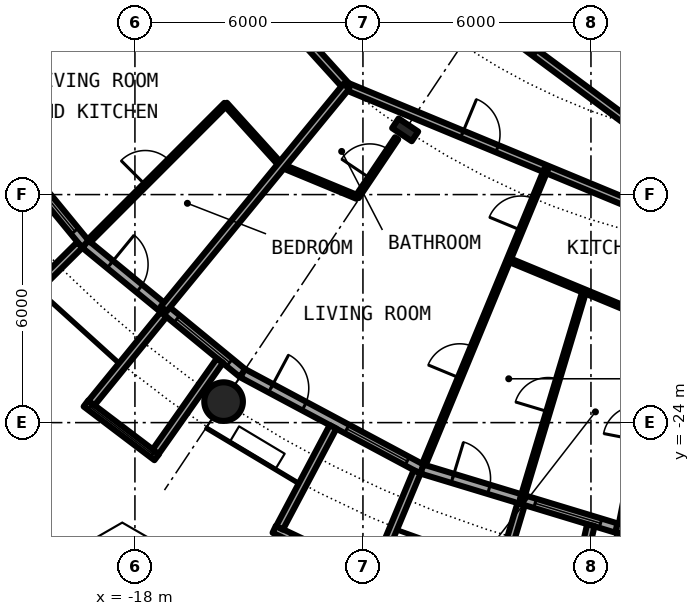
"""IFC4 building model, lengths in metres.
Left out: names, types, materials, properties, quantities, classifications, styles, units other than length and angle.
Written with IfcOpenShell. Run it as: python <this file> out.ifc"""

import sys

from ifc_helpers import new_model, si_unit, direction, frame, frame_2d, origin, origin_2d, place, context, subcontext, project, spatial, rectangle, circle, hollow_circle, i_section, extrude, element, fill, save


model = new_model("IFC4")
c1 = context("Model", 3, precision=1e-05, world=origin(), true_north=direction((0.0, 1.0)))
c2 = subcontext(c1, "Body", "Model", "MODEL_VIEW")
j1 = project(units=[si_unit("LENGTHUNIT", "METRE"), si_unit("PLANEANGLEUNIT", "RADIAN")], contexts=[c1])
p1 = place(None, origin())
s1 = spatial("IfcSite", under=j1, at=p1, CompositionType="ELEMENT")
p2 = place(p1, origin())
s2 = spatial("IfcBuilding", under=s1, at=p2, CompositionType="ELEMENT")
p3 = place(p2, frame((0.0, 0.0, 50.25)))
s3 = spatial("IfcBuildingStorey", under=s2, at=p3, CompositionType="ELEMENT", Elevation=50.25)
p4 = place(p3, frame((-15.667, -23.448, 0.0), z_axis=(0.0, 0.0, 1.0), x_axis=(1.0, 0.0, 0.0)))
e1 = element("IfcColumn", 1, at=p4, inside=s3, PredefinedType="COLUMN", context=c2, shape_type="SweptSolid", body=[
    extrude(hollow_circle(Radius=0.508, WallThickness=0.05, at=origin_2d()), origin(), (0.0, 0.0, 1.0), 3.05),
])
p5 = place(p3, frame((-10.889, -16.297, 0.0), z_axis=(0.0, 0.0, 1.0), x_axis=(-0.55557023302, -0.831469612303, 0.0)))
e2 = element("IfcColumn", 2, at=p5, inside=s3, PredefinedType="COLUMN", context=c2, shape_type="SweptSolid", body=[
    extrude(i_section(OverallWidth=0.305, OverallDepth=0.62, WebThickness=0.021, FlangeThickness=0.04, FilletRadius=0.027, at=origin_2d()), origin(), (0.0, 0.0, 1.0), 3.05),
])
p6 = place(p3, frame((-22.699, -15.167, 0.0), z_axis=(0.0, 0.0, 1.0), x_axis=(0.634382322723, -0.773019449054, 0.0)))
e3 = element("IfcWall", 3, at=p6, inside=s3, PredefinedType="SOLIDWALL", context=c2, shape_type="SweptSolid", body=[
    extrude(rectangle(XDim=5.352, YDim=0.25, at=frame_2d((2.676, 0.0))), origin(), (0.0, 0.0, 1.0), 2.7),
])
p7 = place(p6, frame((0.841, 0.0, 0.0)))
e4 = element("IfcOpeningElement", 4, at=p7, cuts=e3, PredefinedType="OPENING", context=c2, shape_type="SweptSolid", body=[
    extrude(rectangle(XDim=1.0, YDim=2.2, at=frame_2d((0.5, 1.1))), frame((0.0, 0.135, 0.0), z_axis=(0.0, -1.0, 0.0), x_axis=(1.0, 0.0, 0.0)), (0.0, 0.0, 1.0), 0.27),
])
p8 = place(p6, frame((3.111, 0.0, 0.3)))
e5 = element("IfcOpeningElement", 5, at=p8, cuts=e3, PredefinedType="OPENING", context=c2, shape_type="SweptSolid", body=[
    extrude(rectangle(XDim=1.8, YDim=2.1, at=frame_2d((0.9, 1.05))), frame((0.0, 0.135, 0.0), z_axis=(0.0, -1.0, 0.0), x_axis=(1.0, 0.0, 0.0)), (0.0, 0.0, 1.0), 0.27),
])
p9 = place(p3, frame((-19.45, -19.323, -0.03), z_axis=(0.0, 0.0, 1.0), x_axis=(-0.709727076896, -0.704476739375, 0.0)))
e6 = element("IfcWall", 6, at=p9, inside=s3, PredefinedType="SOLIDWALL", context=c2, shape_type="SweptSolid", body=[
    extrude(rectangle(XDim=2.883, YDim=0.2, at=frame_2d((1.441, 0.0))), origin(), (0.0, 0.0, 1.0), 2.73),
])
p10 = place(p3, frame((-19.304, -19.304, 0.0), z_axis=(0.0, 0.0, 1.0), x_axis=(0.773019449054, -0.634382322723, 0.0)))
e7 = element("IfcWall", 7, at=p10, inside=s3, PredefinedType="SOLIDWALL", context=c2, shape_type="SweptSolid", body=[
    extrude(rectangle(XDim=5.352, YDim=0.25, at=frame_2d((2.676, 0.0))), origin(), (0.0, 0.0, 1.0), 2.7),
])
p11 = place(p10, frame((0.841, 0.0, 0.0)))
e8 = element("IfcOpeningElement", 8, at=p11, cuts=e7, PredefinedType="OPENING", context=c2, shape_type="SweptSolid", body=[
    extrude(rectangle(XDim=1.0, YDim=2.2, at=frame_2d((0.5, 1.1))), frame((0.0, 0.135, 0.0), z_axis=(0.0, -1.0, 0.0), x_axis=(1.0, 0.0, 0.0)), (0.0, 0.0, 1.0), 0.27),
])
p12 = place(p10, frame((3.111, 0.0, 0.3)))
e9 = element("IfcOpeningElement", 9, at=p12, cuts=e7, PredefinedType="OPENING", context=c2, shape_type="SweptSolid", body=[
    extrude(rectangle(XDim=1.8, YDim=2.1, at=frame_2d((0.9, 1.05))), frame((0.0, 0.135, 0.0), z_axis=(0.0, -1.0, 0.0), x_axis=(1.0, 0.0, 0.0)), (0.0, 0.0, 1.0), 0.27),
])
p13 = place(p3, frame((-19.289, -23.497, -0.03), z_axis=(0.0, 0.0, 1.0), x_axis=(0.796842165306, -0.60418752353, 0.0)))
e10 = element("IfcWall", 10, at=p13, inside=s3, PredefinedType="SOLIDWALL", context=c2, shape_type="SweptSolid", body=[
    extrude(rectangle(XDim=2.337, YDim=0.2, at=frame_2d((1.168, 0.0))), origin(), (0.0, 0.0, 1.0), 2.73),
])
p14 = place(p13, frame((0.128, 0.0, 0.33)))
e11 = element("IfcOpeningElement", 11, at=p14, cuts=e10, PredefinedType="OPENING", context=c2, shape_type="SweptSolid", body=[
    extrude(circle(Radius=1.04, at=frame_2d((1.04, 1.04))), frame((0.0, 0.11, 0.0), z_axis=(0.0, -1.0, 0.0), x_axis=(1.0, 0.0, 0.0)), (0.0, 0.0, 1.0), 0.22),
])
p15 = place(p3, frame((-17.246, -21.155, -0.03), z_axis=(0.0, 0.0, 1.0), x_axis=(-0.631741648902, -0.775179004516, 0.0)))
e12 = element("IfcWall", 12, at=p15, inside=s3, PredefinedType="SOLIDWALL", context=c2, shape_type="SweptSolid", body=[
    extrude(rectangle(XDim=3.006, YDim=0.2, at=frame_2d((1.503, 0.0))), origin(), (0.0, 0.0, 1.0), 2.73),
])
p16 = place(p3, frame((-15.765, -22.37, -0.03), z_axis=(0.0, 0.0, 1.0), x_axis=(-0.576274612209, -0.817256123454, 0.0)))
e13 = element("IfcWall", 13, at=p16, inside=s3, PredefinedType="SOLIDWALL", context=c2, shape_type="SweptSolid", body=[
    extrude(rectangle(XDim=2.933, YDim=0.2, at=frame_2d((1.466, 0.0))), origin(), (0.0, 0.0, 1.0), 2.73),
])
p17 = place(p3, frame((-15.167, -22.699, 0.0), z_axis=(0.0, 0.0, 1.0), x_axis=(0.881915646801, -0.471407246368, 0.0)))
e14 = element("IfcWall", 14, at=p17, inside=s3, PredefinedType="SOLIDWALL", context=c2, shape_type="SweptSolid", body=[
    extrude(rectangle(XDim=5.352, YDim=0.25, at=frame_2d((2.676, 0.0))), origin(), (0.0, 0.0, 1.0), 2.7),
])
p18 = place(p17, frame((0.841, 0.0, 0.0)))
e15 = element("IfcOpeningElement", 15, at=p18, cuts=e14, PredefinedType="OPENING", context=c2, shape_type="SweptSolid", body=[
    extrude(rectangle(XDim=1.0, YDim=2.2, at=frame_2d((0.5, 1.1))), frame((0.0, 0.135, 0.0), z_axis=(0.0, -1.0, 0.0), x_axis=(1.0, 0.0, 0.0)), (0.0, 0.0, 1.0), 0.27),
])
p19 = place(p17, frame((3.111, 0.0, 0.3)))
e16 = element("IfcOpeningElement", 16, at=p19, cuts=e14, PredefinedType="OPENING", context=c2, shape_type="SweptSolid", body=[
    extrude(rectangle(XDim=1.8, YDim=2.1, at=frame_2d((0.9, 1.05))), frame((0.0, 0.135, 0.0), z_axis=(0.0, -1.0, 0.0), x_axis=(1.0, 0.0, 0.0)), (0.0, 0.0, 1.0), 0.27),
])
p20 = place(p3, frame((-14.335, -26.808, -0.03), z_axis=(0.0, 0.0, 1.0), x_axis=(0.904000060331, -0.427532327342, 0.0)))
e17 = element("IfcWall", 17, at=p20, inside=s3, PredefinedType="SOLIDWALL", context=c2, shape_type="SweptSolid", body=[
    extrude(rectangle(XDim=2.993, YDim=0.2, at=frame_2d((1.497, 0.0))), origin(), (0.0, 0.0, 1.0), 2.73),
])
p21 = place(p20, frame((0.457, 0.0, 0.33)))
e18 = element("IfcOpeningElement", 18, at=p21, cuts=e17, PredefinedType="OPENING", context=c2, shape_type="SweptSolid", body=[
    extrude(circle(Radius=1.04, at=frame_2d((1.04, 1.04))), frame((0.0, 0.11, 0.0), z_axis=(0.0, -1.0, 0.0), x_axis=(1.0, 0.0, 0.0)), (0.0, 0.0, 1.0), 0.22),
])
p22 = place(p3, frame((-12.787, -24.113, -0.03), z_axis=(0.0, 0.0, 1.0), x_axis=(-0.468365282436, -0.883534924159, 0.0)))
e19 = element("IfcWall", 19, at=p22, inside=s3, PredefinedType="SOLIDWALL", context=c2, shape_type="SweptSolid", body=[
    extrude(rectangle(XDim=3.006, YDim=0.2, at=frame_2d((1.503, 0.0))), origin(), (0.0, 0.0, 1.0), 2.73),
])
p23 = place(p3, frame((-10.575, -25.295, -0.03), z_axis=(0.0, 0.0, 1.0), x_axis=(-0.385697364644, -0.922625353492, 0.0)))
e20 = element("IfcWall", 20, at=p23, inside=s3, PredefinedType="SOLIDWALL", context=c2, shape_type="SweptSolid", body=[
    extrude(rectangle(XDim=2.883, YDim=0.2, at=frame_2d((1.442, 0.0))), origin(), (0.0, 0.0, 1.0), 2.73),
])
p24 = place(p3, frame((-10.447, -25.222, 0.0), z_axis=(0.0, 0.0, 1.0), x_axis=(0.956965678721, -0.290201119486, 0.0)))
e21 = element("IfcWall", 21, at=p24, inside=s3, PredefinedType="SOLIDWALL", context=c2, shape_type="SweptSolid", body=[
    extrude(rectangle(XDim=5.351, YDim=0.25, at=frame_2d((2.676, 0.0))), origin(), (0.0, 0.0, 1.0), 2.7),
])
p25 = place(p24, frame((0.841, 0.0, 0.0)))
e22 = element("IfcOpeningElement", 22, at=p25, cuts=e21, PredefinedType="OPENING", context=c2, shape_type="SweptSolid", body=[
    extrude(rectangle(XDim=1.0, YDim=2.2, at=frame_2d((0.5, 1.1))), frame((0.0, 0.135, 0.0), z_axis=(0.0, -1.0, 0.0), x_axis=(1.0, 0.0, 0.0)), (0.0, 0.0, 1.0), 0.27),
])
p26 = place(p24, frame((3.111, 0.0, 0.3)))
e23 = element("IfcOpeningElement", 23, at=p26, cuts=e21, PredefinedType="OPENING", context=c2, shape_type="SweptSolid", body=[
    extrude(rectangle(XDim=1.8, YDim=2.1, at=frame_2d((0.9, 1.05))), frame((0.0, 0.135, 0.0), z_axis=(0.0, -1.0, 0.0), x_axis=(1.0, 0.0, 0.0)), (0.0, 0.0, 1.0), 0.27),
])
p27 = place(p3, frame((-7.837, -26.144, -0.03), z_axis=(0.0, 0.0, 1.0), x_axis=(-0.287064767992, -0.957911174889, 0.0)))
e24 = element("IfcWall", 24, at=p27, inside=s3, PredefinedType="SOLIDWALL", context=c2, shape_type="SweptSolid", body=[
    extrude(rectangle(XDim=3.006, YDim=0.2, at=frame_2d((1.503, 0.0))), origin(), (0.0, 0.0, 1.0), 2.73),
])
p28 = place(p3, frame((-6.004, -26.7, -0.03), z_axis=(0.0, 0.0, 1.0), x_axis=(-0.219609259383, -0.975587911566, 0.0)))
e25 = element("IfcWall", 25, at=p28, inside=s3, PredefinedType="SOLIDWALL", context=c2, shape_type="SweptSolid", body=[
    extrude(rectangle(XDim=2.933, YDim=0.2, at=frame_2d((1.466, 0.0))), origin(), (0.0, 0.0, 1.0), 2.73),
])
p29 = place(p3, frame((-5.326, -26.775, 0.0), z_axis=(0.0, 0.0, 1.0), x_axis=(0.995173996315, -0.098126026407, 0.0)))
e26 = element("IfcWall", 26, at=p29, inside=s3, PredefinedType="SOLIDWALL", context=c2, shape_type="SweptSolid", body=[
    extrude(rectangle(XDim=5.352, YDim=0.25, at=frame_2d((2.676, 0.0))), origin(), (0.0, 0.0, 1.0), 2.7),
])
p30 = place(p29, frame((0.841, 0.0, 0.0)))
e27 = element("IfcOpeningElement", 27, at=p30, cuts=e26, PredefinedType="OPENING", context=c2, shape_type="SweptSolid", body=[
    extrude(rectangle(XDim=1.0, YDim=2.2, at=frame_2d((0.5, 1.1))), frame((0.0, 0.135, 0.0), z_axis=(0.0, -1.0, 0.0), x_axis=(1.0, 0.0, 0.0)), (0.0, 0.0, 1.0), 0.27),
])
p31 = place(p29, frame((3.111, 0.0, 0.3)))
e28 = element("IfcOpeningElement", 28, at=p31, cuts=e26, PredefinedType="OPENING", context=c2, shape_type="SweptSolid", body=[
    extrude(rectangle(XDim=1.8, YDim=2.1, at=frame_2d((0.9, 1.05))), frame((0.0, 0.135, 0.0), z_axis=(0.0, -1.0, 0.0), x_axis=(1.0, 0.0, 0.0)), (0.0, 0.0, 1.0), 0.27),
])
p32 = place(p3, frame((-15.617, -15.617, 0.0), z_axis=(0.0, 0.0, 1.0), x_axis=(0.671144831591, -0.741326254107, 0.0)))
e29 = element("IfcWall", 29, at=p32, inside=s3, PredefinedType="PARTITIONING", context=c2, shape_type="SweptSolid", body=[
    extrude(rectangle(XDim=2.181, YDim=0.1, at=frame_2d((1.091, 0.0))), origin(), (0.0, 0.0, 1.0), 2.7),
])
p33 = place(p3, frame((-14.147, -17.238, 0.0), z_axis=(0.0, 0.0, 1.0), x_axis=(0.923874819588, -0.382694810171, 0.0)))
e30 = element("IfcWall", 30, at=p33, inside=s3, PredefinedType="PARTITIONING", context=c2, shape_type="SweptSolid", body=[
    extrude(rectangle(XDim=2.158, YDim=0.1, at=frame_2d((1.079, 0.0))), origin(), (0.0, 0.0, 1.0), 2.7),
])
p34 = place(p3, frame((-8.164, -19.716, 0.0), z_axis=(0.0, 0.0, 1.0), x_axis=(0.92387253274, -0.38270033087, 0.0)))
e31 = element("IfcWall", 31, at=p34, inside=s3, PredefinedType="PARTITIONING", context=c2, shape_type="SweptSolid", body=[
    extrude(rectangle(XDim=6.475, YDim=0.1, at=frame_2d((3.238, 0.0))), origin(), (0.0, 0.0, 1.0), 2.7),
])
p35 = place(p3, frame((-16.193, -11.003, 0.0), z_axis=(0.0, 0.0, 1.0), x_axis=(0.671514934772, -0.740991020444, 0.0)))
e32 = element("IfcWall", 32, at=p35, inside=s3, PredefinedType="PARTITIONING", context=c2, shape_type="SweptSolid", body=[
    extrude(rectangle(XDim=5.598, YDim=0.2, at=frame_2d((2.799, 0.0))), origin(), (0.0, 0.0, 1.0), 2.38),
])
p36 = place(p35, frame((3.18, 0.0, 0.0)))
e33 = element("IfcOpeningElement", 33, at=p36, cuts=e32, PredefinedType="OPENING", context=c2, shape_type="SweptSolid", body=[
    extrude(rectangle(XDim=1.0, YDim=2.3, at=frame_2d((0.5, 1.15))), frame((0.0, 0.11, 0.0), z_axis=(0.0, -1.0, 0.0), x_axis=(1.0, 0.0, 0.0)), (0.0, 0.0, 1.0), 0.22),
])
p37 = place(p3, frame((-12.434, -15.151, 0.0), z_axis=(0.0, 0.0, 1.0), x_axis=(0.923888467236, -0.382661861319, 0.0)))
e34 = element("IfcWall", 34, at=p37, inside=s3, PredefinedType="PARTITIONING", context=c2, shape_type="SweptSolid", body=[
    extrude(rectangle(XDim=11.381, YDim=0.2, at=frame_2d((5.691, 0.0))), origin(), (0.0, 0.0, 1.0), 2.7),
])
p38 = place(p37, frame((3.292, 0.0, 0.0)))
e35 = element("IfcOpeningElement", 35, at=p38, cuts=e34, PredefinedType="OPENING", context=c2, shape_type="SweptSolid", body=[
    extrude(rectangle(XDim=1.0, YDim=2.3, at=frame_2d((0.5, 1.15))), frame((0.0, 0.11, 0.0), z_axis=(0.0, -1.0, 0.0), x_axis=(1.0, 0.0, 0.0)), (0.0, 0.0, 1.0), 0.22),
])
p39 = place(p3, frame((-14.037, -9.4, 0.0), z_axis=(0.0, 0.0, 1.0), x_axis=(0.803202106898, -0.595706618626, 0.0)))
e36 = element("IfcWall", 36, at=p39, inside=s3, PredefinedType="PARTITIONING", context=c2, shape_type="SweptSolid", body=[
    extrude(rectangle(XDim=11.368, YDim=0.2, at=frame_2d((5.684, 0.0))), origin(), (0.0, 0.0, 1.0), 2.7),
])
p40 = place(p39, frame((5.988, 0.0, 0.0)))
e37 = element("IfcOpeningElement", 37, at=p40, cuts=e36, PredefinedType="OPENING", context=c2, shape_type="SweptSolid", body=[
    extrude(rectangle(XDim=1.0, YDim=2.3, at=frame_2d((0.5, 1.15))), frame((0.0, 0.11, 0.0), z_axis=(0.0, -1.0, 0.0), x_axis=(1.0, 0.0, 0.0)), (0.0, 0.0, 1.0), 0.22),
])
p41 = place(p3, frame((-22.595, -15.098, 0.0), z_axis=(0.0, 0.0, 1.0), x_axis=(0.831387096605, 0.55569370664, 0.0)))
e38 = element("IfcWall", 38, at=p41, inside=s3, PredefinedType="PARTITIONING", context=c2, shape_type="SweptSolid", body=[
    extrude(rectangle(XDim=4.875, YDim=0.2, at=frame_2d((2.438, 0.0))), origin(), (0.0, 0.0, 1.0), 2.7),
])
p42 = place(p3, frame((-19.21, -19.222, 0.0), z_axis=(0.0, 0.0, 1.0), x_axis=(0.706914880313, 0.707298629994, 0.0)))
e39 = element("IfcWall", 39, at=p42, inside=s3, PredefinedType="PARTITIONING", context=c2, shape_type="SweptSolid", body=[
    extrude(rectangle(XDim=5.09, YDim=0.1, at=frame_2d((2.545, 0.0))), origin(), (0.0, 0.0, 1.0), 2.7),
])
p43 = place(p42, frame((2.095, 0.0, 0.0)))
e40 = element("IfcOpeningElement", 40, at=p43, cuts=e39, PredefinedType="OPENING", context=c2, shape_type="SweptSolid", body=[
    extrude(rectangle(XDim=0.9, YDim=2.3, at=frame_2d((0.45, 1.15))), frame((0.0, 0.06, 0.0), z_axis=(0.0, -1.0, 0.0), x_axis=(1.0, 0.0, 0.0)), (0.0, 0.0, 1.0), 0.12),
])
p44 = place(p3, frame((-17.241, -21.006, 0.0), z_axis=(0.0, 0.0, 1.0), x_axis=(0.634381303318, 0.773020285633, 0.0)))
e41 = element("IfcWall", 41, at=p44, inside=s3, PredefinedType="PARTITIONING", context=c2, shape_type="SweptSolid", body=[
    extrude(rectangle(XDim=7.576, YDim=0.2, at=frame_2d((3.788, 0.0))), origin(), (0.0, 0.0, 1.0), 2.7),
])
p45 = place(p3, frame((-12.153, -18.064, 0.0), z_axis=(0.0, 0.0, 1.0), x_axis=(0.558084773293, 0.829783939239, 0.0)))
e42 = element("IfcWall", 42, at=p45, inside=s3, PredefinedType="PARTITIONING", context=c2, shape_type="SweptSolid", body=[
    extrude(rectangle(XDim=1.862, YDim=0.1, at=frame_2d((0.931, 0.0))), origin(), (0.0, 0.0, 1.0), 2.7),
])
p46 = place(p45, frame((0.6, 0.0, 0.0)))
e43 = element("IfcOpeningElement", 43, at=p46, cuts=e42, PredefinedType="OPENING", context=c2, shape_type="SweptSolid", body=[
    extrude(rectangle(XDim=0.9, YDim=2.3, at=frame_2d((0.45, 1.15))), frame((0.0, 0.06, 0.0), z_axis=(0.0, -1.0, 0.0), x_axis=(1.0, 0.0, 0.0)), (0.0, 0.0, 1.0), 0.12),
])
p47 = place(p3, frame((-10.399, -25.106, 0.0), z_axis=(0.0, 0.0, 1.0), x_axis=(0.382697543868, 0.923873687209, 0.0)))
e44 = element("IfcWall", 44, at=p47, inside=s3, PredefinedType="PARTITIONING", context=c2, shape_type="SweptSolid", body=[
    extrude(rectangle(XDim=8.419, YDim=0.1, at=frame_2d((4.209, 0.0))), origin(), (0.0, 0.0, 1.0), 2.7),
])
p48 = place(p47, frame((6.677, 0.0, 0.0)))
e45 = element("IfcOpeningElement", 45, at=p48, cuts=e44, PredefinedType="OPENING", context=c2, shape_type="SweptSolid", body=[
    extrude(rectangle(XDim=0.9, YDim=2.3, at=frame_2d((0.45, 1.15))), frame((0.0, 0.06, 0.0), z_axis=(0.0, -1.0, 0.0), x_axis=(1.0, 0.0, 0.0)), (0.0, 0.0, 1.0), 0.12),
])
p49 = place(p47, frame((2.468, 0.0, 0.0)))
e46 = element("IfcOpeningElement", 46, at=p49, cuts=e44, PredefinedType="OPENING", context=c2, shape_type="SweptSolid", body=[
    extrude(rectangle(XDim=0.9, YDim=2.3, at=frame_2d((0.45, 1.15))), frame((0.0, 0.06, 0.0), z_axis=(0.0, -1.0, 0.0), x_axis=(1.0, 0.0, 0.0)), (0.0, 0.0, 1.0), 0.12),
])
p50 = place(p3, frame((-7.821, -26.025, 0.0), z_axis=(0.0, 0.0, 1.0), x_axis=(0.287793773423, 0.957692405723, 0.0)))
e47 = element("IfcWall", 47, at=p50, inside=s3, PredefinedType="PARTITIONING", context=c2, shape_type="SweptSolid", body=[
    extrude(rectangle(XDim=5.726, YDim=0.1, at=frame_2d((2.863, 0.0))), origin(), (0.0, 0.0, 1.0), 2.7),
])
p51 = place(p50, frame((2.413, 0.0, 0.0)))
e48 = element("IfcOpeningElement", 48, at=p51, cuts=e47, PredefinedType="OPENING", context=c2, shape_type="SweptSolid", body=[
    extrude(rectangle(XDim=0.9, YDim=2.3, at=frame_2d((0.45, 1.15))), frame((0.0, 0.06, 0.0), z_axis=(0.0, -1.0, 0.0), x_axis=(1.0, 0.0, 0.0)), (0.0, 0.0, 1.0), 0.12),
])
p52 = place(p3, frame((-5.217, -26.67, 0.0), z_axis=(0.0, 0.0, 1.0), x_axis=(0.192109041462, 0.981373586453, 0.0)))
e49 = element("IfcWall", 49, at=p52, inside=s3, PredefinedType="PARTITIONING", context=c2, shape_type="SweptSolid", body=[
    extrude(rectangle(XDim=5.404, YDim=0.1, at=frame_2d((2.702, 0.0))), origin(), (0.0, 0.0, 1.0), 2.7),
])
p53 = place(p52, frame((2.252, 0.0, 0.0)))
e50 = element("IfcOpeningElement", 50, at=p53, cuts=e49, PredefinedType="OPENING", context=c2, shape_type="SweptSolid", body=[
    extrude(rectangle(XDim=0.9, YDim=2.3, at=frame_2d((0.45, 1.15))), frame((0.0, 0.06, 0.0), z_axis=(0.0, -1.0, 0.0), x_axis=(1.0, 0.0, 0.0)), (0.0, 0.0, 1.0), 0.12),
])
p54 = place(p8, origin())
e51 = element("IfcWindow", 51, at=p54, inside=s3, PartitioningType="SINGLE_PANEL", PredefinedType="WINDOW", context=c2, shape_type="SweptSolid", body=[
    extrude(rectangle(XDim=1.8, YDim=2.1, at=frame_2d((0.9, 1.05))), frame((0.0, 0.03, 0.0), z_axis=(0.0, -1.0, 0.0), x_axis=(1.0, 0.0, 0.0)), (0.0, 0.0, 1.0), 0.06),
])
fill(e5, e51)
p55 = place(p11, origin())
e52 = element("IfcDoor", 52, at=p55, inside=s3, OperationType="SINGLE_SWING_LEFT", PredefinedType="DOOR", context=c2, shape_type="SweptSolid", body=[
    extrude(rectangle(XDim=1.0, YDim=2.2, at=frame_2d((0.5, 1.1))), frame((0.0, 0.025, 0.0), z_axis=(0.0, -1.0, 0.0), x_axis=(1.0, 0.0, 0.0)), (0.0, 0.0, 1.0), 0.05),
])
fill(e8, e52)
p56 = place(p12, origin())
e53 = element("IfcWindow", 53, at=p56, inside=s3, PartitioningType="SINGLE_PANEL", PredefinedType="WINDOW", context=c2, shape_type="SweptSolid", body=[
    extrude(rectangle(XDim=1.8, YDim=2.1, at=frame_2d((0.9, 1.05))), frame((0.0, 0.03, 0.0), z_axis=(0.0, -1.0, 0.0), x_axis=(1.0, 0.0, 0.0)), (0.0, 0.0, 1.0), 0.06),
])
fill(e9, e53)
p57 = place(p14, origin())
e54 = element("IfcWindow", 54, at=p57, inside=s3, PartitioningType="SINGLE_PANEL", PredefinedType="WINDOW", context=c2, shape_type="SweptSolid", body=[
    extrude(circle(Radius=1.04, at=frame_2d((1.04, 1.04))), frame((0.0, 0.03, 0.0), z_axis=(0.0, -1.0, 0.0), x_axis=(1.0, 0.0, 0.0)), (0.0, 0.0, 1.0), 0.06),
])
fill(e11, e54)
p58 = place(p18, origin())
e55 = element("IfcDoor", 55, at=p58, inside=s3, OperationType="SINGLE_SWING_LEFT", PredefinedType="DOOR", context=c2, shape_type="SweptSolid", body=[
    extrude(rectangle(XDim=1.0, YDim=2.2, at=frame_2d((0.5, 1.1))), frame((0.0, 0.025, 0.0), z_axis=(0.0, -1.0, 0.0), x_axis=(1.0, 0.0, 0.0)), (0.0, 0.0, 1.0), 0.05),
])
fill(e15, e55)
p59 = place(p19, origin())
e56 = element("IfcWindow", 56, at=p59, inside=s3, PartitioningType="SINGLE_PANEL", PredefinedType="WINDOW", context=c2, shape_type="SweptSolid", body=[
    extrude(rectangle(XDim=1.8, YDim=2.1, at=frame_2d((0.9, 1.05))), frame((0.0, 0.03, 0.0), z_axis=(0.0, -1.0, 0.0), x_axis=(1.0, 0.0, 0.0)), (0.0, 0.0, 1.0), 0.06),
])
fill(e16, e56)
p60 = place(p21, origin())
e57 = element("IfcWindow", 57, at=p60, inside=s3, PartitioningType="SINGLE_PANEL", PredefinedType="WINDOW", context=c2, shape_type="SweptSolid", body=[
    extrude(circle(Radius=1.04, at=frame_2d((1.04, 1.04))), frame((0.0, 0.03, 0.0), z_axis=(0.0, -1.0, 0.0), x_axis=(1.0, 0.0, 0.0)), (0.0, 0.0, 1.0), 0.06),
])
fill(e18, e57)
p61 = place(p25, origin())
e58 = element("IfcDoor", 58, at=p61, inside=s3, OperationType="SINGLE_SWING_LEFT", PredefinedType="DOOR", context=c2, shape_type="SweptSolid", body=[
    extrude(rectangle(XDim=1.0, YDim=2.2, at=frame_2d((0.5, 1.1))), frame((0.0, 0.025, 0.0), z_axis=(0.0, -1.0, 0.0), x_axis=(1.0, 0.0, 0.0)), (0.0, 0.0, 1.0), 0.05),
])
fill(e22, e58)
p62 = place(p26, origin())
e59 = element("IfcWindow", 59, at=p62, inside=s3, PartitioningType="SINGLE_PANEL", PredefinedType="WINDOW", context=c2, shape_type="SweptSolid", body=[
    extrude(rectangle(XDim=1.8, YDim=2.1, at=frame_2d((0.9, 1.05))), frame((0.0, 0.03, 0.0), z_axis=(0.0, -1.0, 0.0), x_axis=(1.0, 0.0, 0.0)), (0.0, 0.0, 1.0), 0.06),
])
fill(e23, e59)
p63 = place(p43, origin())
e60 = element("IfcDoor", 60, at=p63, inside=s3, OperationType="SINGLE_SWING_RIGHT", PredefinedType="DOOR", context=c2, shape_type="SweptSolid", body=[
    extrude(rectangle(XDim=0.9, YDim=2.3, at=frame_2d((0.45, 1.15))), frame((0.0, 0.025, 0.0), z_axis=(0.0, -1.0, 0.0), x_axis=(1.0, 0.0, 0.0)), (0.0, 0.0, 1.0), 0.05),
])
fill(e40, e60)
p64 = place(p38, origin())
e61 = element("IfcDoor", 61, at=p64, inside=s3, OperationType="SINGLE_SWING_LEFT", PredefinedType="DOOR", context=c2, shape_type="SweptSolid", body=[
    extrude(rectangle(XDim=1.0, YDim=2.3, at=frame_2d((0.5, 1.15))), frame((0.0, 0.025, 0.0), z_axis=(0.0, -1.0, 0.0), x_axis=(1.0, 0.0, 0.0)), (0.0, 0.0, 1.0), 0.05),
])
fill(e35, e61)
p65 = place(p46, origin())
e62 = element("IfcDoor", 62, at=p65, inside=s3, OperationType="SINGLE_SWING_RIGHT", PredefinedType="DOOR", context=c2, shape_type="SweptSolid", body=[
    extrude(rectangle(XDim=0.9, YDim=2.3, at=frame_2d((0.45, 1.15))), frame((0.0, 0.025, 0.0), z_axis=(0.0, -1.0, 0.0), x_axis=(1.0, 0.0, 0.0)), (0.0, 0.0, 1.0), 0.05),
])
fill(e43, e62)
p66 = place(p48, origin())
e63 = element("IfcDoor", 63, at=p66, inside=s3, OperationType="SINGLE_SWING_RIGHT", PredefinedType="DOOR", context=c2, shape_type="SweptSolid", body=[
    extrude(rectangle(XDim=0.9, YDim=2.3, at=frame_2d((0.45, 1.15))), frame((0.0, 0.025, 0.0), z_axis=(0.0, -1.0, 0.0), x_axis=(1.0, 0.0, 0.0)), (0.0, 0.0, 1.0), 0.05),
])
fill(e45, e63)
p67 = place(p49, origin())
e64 = element("IfcDoor", 64, at=p67, inside=s3, OperationType="SINGLE_SWING_LEFT", PredefinedType="DOOR", context=c2, shape_type="SweptSolid", body=[
    extrude(rectangle(XDim=0.9, YDim=2.3, at=frame_2d((0.45, 1.15))), frame((0.0, 0.025, 0.0), z_axis=(0.0, -1.0, 0.0), x_axis=(1.0, 0.0, 0.0)), (0.0, 0.0, 1.0), 0.05),
])
fill(e46, e64)
p68 = place(p51, origin())
e65 = element("IfcDoor", 65, at=p68, inside=s3, OperationType="SINGLE_SWING_LEFT", PredefinedType="DOOR", context=c2, shape_type="SweptSolid", body=[
    extrude(rectangle(XDim=0.9, YDim=2.3, at=frame_2d((0.45, 1.15))), frame((0.0, 0.025, 0.0), z_axis=(0.0, -1.0, 0.0), x_axis=(1.0, 0.0, 0.0)), (0.0, 0.0, 1.0), 0.05),
])
fill(e48, e65)
save(model, sys.argv[1])
